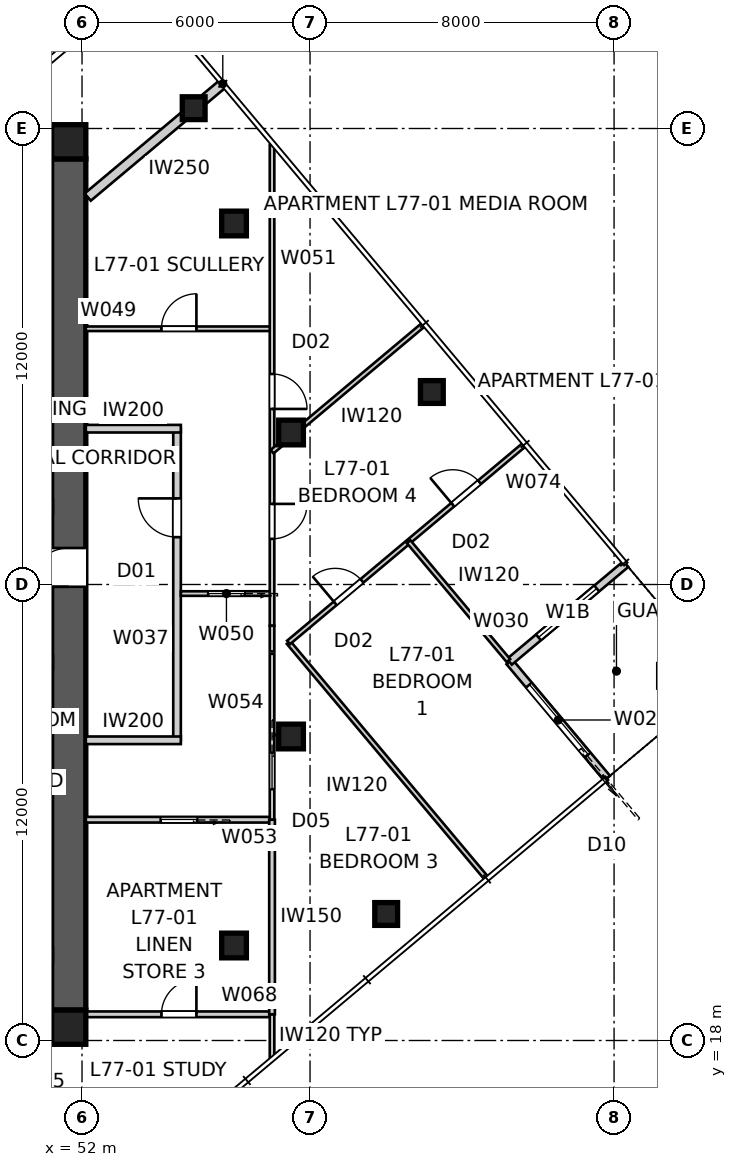
"""IFC4 building model, lengths in metres.
Left out: names, types, materials, properties, quantities, classifications, styles, units other than length and angle.
Written with IfcOpenShell. Run it as: python <this file> out.ifc"""

import sys

from ifc_helpers import new_model, si_unit, direction, frame, frame_2d, origin, origin_2d, place, context, subcontext, project, spatial, polyline, rectangle, outline, extrude, element, fill, save


model = new_model("IFC4")
c1 = context("Model", 3, precision=1e-05, world=origin(), true_north=direction((0.0, 1.0)))
c2 = subcontext(c1, "Body", "Model", "MODEL_VIEW")
j1 = project(units=[si_unit("LENGTHUNIT", "METRE"), si_unit("PLANEANGLEUNIT", "RADIAN")], contexts=[c1])
p1 = place(None, origin())
s1 = spatial("IfcSite", under=j1, at=p1, CompositionType="ELEMENT")
p2 = place(p1, origin())
s2 = spatial("IfcBuilding", under=s1, at=p2, CompositionType="ELEMENT")
p3 = place(p2, frame((0.0, 0.0, 279.4)))
s3 = spatial("IfcBuildingStorey", under=s2, at=p3, CompositionType="ELEMENT", Elevation=279.4)
for number, where, z_axis, x_axis in (
    (1, (28.8, 41.65, 0.0), (0.0, 0.0, 1.0), (1.0, 0.0, 0.0)),
    (2, (51.2, 18.35, 0.0), (0.0, 0.0, 1.0), (-1.0, 0.0, 0.0)),
):
    element("IfcWall", number, at=place(p3, frame(where, z_axis=z_axis, x_axis=x_axis)), inside=s3, PredefinedType="SHEAR", context=c2, shape_type="SweptSolid", body=[
        extrude(outline(polyline([(0.0, -0.45), (22.4, -0.45), (22.4, -0.025), (22.85, -0.025), (22.85, 0.025), (22.4, 0.025), (22.4, 0.45), (0.0, 0.45), (0.0, 0.025), (-0.45, 0.025), (-0.45, -0.025), (0.0, -0.025), (0.0, -0.45)])), origin(), (0.0, 0.0, 1.0), 3.4),
    ])
p4 = place(p3, frame((51.65, 18.8, 0.0), z_axis=(0.0, 0.0, 1.0), x_axis=(0.0, 1.0, 0.0)))
e3 = element("IfcWall", 3, at=p4, inside=s3, PredefinedType="SHEAR", context=c2, shape_type="SweptSolid", body=[
    extrude(outline(polyline([(0.0, -0.45), (22.4, -0.45), (22.4, -0.025), (22.85, -0.025), (22.85, 0.025), (22.4, 0.025), (22.4, 0.45), (0.0, 0.45), (0.0, 0.025), (-0.45, 0.025), (-0.45, -0.025), (0.0, -0.025), (0.0, -0.45)])), origin(), (0.0, 0.0, 1.0), 3.4),
])
p5 = place(p4, frame((11.14, 0.0, 0.0)))
e4 = element("IfcOpeningElement", 4, at=p5, cuts=e3, PredefinedType="OPENING", context=c2, shape_type="SweptSolid", body=[
    extrude(rectangle(XDim=1.02, YDim=2.4, at=frame_2d((0.51, 1.2))), frame((0.0, 0.46, 0.0), z_axis=(0.0, -1.0, 0.0), x_axis=(1.0, 0.0, 0.0)), (0.0, 0.0, 1.0), 0.92),
])
for number, where, z_axis, x_axis in (
    (5, (51.65, 18.35, 0.0), (0.0, 0.0, 1.0), (1.0, 0.0, 0.0)),
    (6, (51.65, 41.65, 0.0), (0.0, 0.0, 1.0), (1.0, 0.0, 0.0)),
):
    element("IfcColumn", number, at=place(p3, frame(where, z_axis=z_axis, x_axis=x_axis)), inside=s3, PredefinedType="COLUMN", context=c2, shape_type="SweptSolid", body=[
        extrude(rectangle(XDim=0.9, YDim=0.9, at=origin_2d()), origin(), (0.0, 0.0, 1.0), 3.4),
    ])
for number, where, z_axis, x_axis in (
    (7, (60.003, 21.329, 0.0), (0.0, 0.0, 1.0), (1.0, 0.0, 0.0)),
    (8, (61.205, 35.065, 0.0), (0.0, 0.0, 1.0), (1.0, 0.0, 0.0)),
    (9, (54.938, 42.534, 0.0), (0.0, 0.0, 1.0), (1.0, 0.0, 0.0)),
):
    element("IfcColumn", number, at=place(p3, frame(where, z_axis=z_axis, x_axis=x_axis)), inside=s3, PredefinedType="COLUMN", context=c2, shape_type="SweptSolid", body=[
        extrude(rectangle(XDim=0.6, YDim=0.6, at=origin_2d()), origin(), (0.0, 0.0, 1.0), 3.4),
    ])
for number, where, z_axis, x_axis in (
    (10, (57.5, 26.0, 0.0), (0.0, 0.0, 1.0), (1.0, 0.0, 0.0)),
    (11, (57.5, 34.0, 0.0), (0.0, 0.0, 1.0), (1.0, 0.0, 0.0)),
    (12, (56.0, 39.5, 0.0), (0.0, 0.0, 1.0), (1.0, 0.0, 0.0)),
    (13, (56.0, 20.5, 0.0), (0.0, 0.0, 1.0), (1.0, 0.0, 0.0)),
):
    element("IfcColumn", number, at=place(p3, frame(where, z_axis=z_axis, x_axis=x_axis)), inside=s3, PredefinedType="COLUMN", context=c2, shape_type="SweptSolid", body=[
        extrude(rectangle(XDim=0.65, YDim=0.65, at=origin_2d()), origin(), (0.0, 0.0, 1.0), 3.4),
    ])
p6 = place(p3, frame((65.817, 24.902, 0.0), z_axis=(0.0, 0.0, 1.0), x_axis=(-0.642768287094, 0.766060656284, 0.0)))
e14 = element("IfcWall", 14, at=p6, inside=s3, PredefinedType="SOLIDWALL", context=c2, shape_type="SweptSolid", body=[
    extrude(rectangle(XDim=4.0, YDim=0.2, at=frame_2d((2.0, 0.0))), origin(), (0.0, 0.0, 1.0), 3.25),
])
p7 = place(p6, frame((0.8, 0.0, 0.0)))
e15 = element("IfcOpeningElement", 15, at=p7, cuts=e14, PredefinedType="OPENING", context=c2, shape_type="SweptSolid", body=[
    extrude(rectangle(XDim=2.4, YDim=2.4, at=frame_2d((1.2, 1.2))), frame((0.0, 0.11, 0.0), z_axis=(0.0, -1.0, 0.0), x_axis=(1.0, 0.0, 0.0)), (0.0, 0.0, 1.0), 0.22),
])
p8 = place(p3, frame((63.246, 27.966, 0.0), z_axis=(0.0, 0.0, 1.0), x_axis=(0.766035437498, 0.642798342015, 0.0)))
e16 = element("IfcWall", 16, at=p8, inside=s3, PredefinedType="SOLIDWALL", context=c2, shape_type="SweptSolid", body=[
    extrude(rectangle(XDim=4.0, YDim=0.2, at=frame_2d((2.0, 0.0))), origin(), (0.0, 0.0, 1.0), 3.25),
])
p9 = place(p8, frame((1.0, 0.0, 0.45)))
e17 = element("IfcOpeningElement", 17, at=p9, cuts=e16, PredefinedType="OPENING", context=c2, shape_type="SweptSolid", body=[
    extrude(rectangle(XDim=2.0, YDim=1.8, at=frame_2d((1.0, 0.9))), frame((0.0, 0.11, 0.0), z_axis=(0.0, -1.0, 0.0), x_axis=(1.0, 0.0, 0.0)), (0.0, 0.0, 1.0), 0.22),
])
p10 = place(p3, frame((54.5, 25.9, 0.0), z_axis=(0.0, 0.0, 1.0), x_axis=(0.0, 1.0, 0.0)))
e18 = element("IfcWall", 18, at=p10, inside=s3, PredefinedType="PARTITIONING", context=c2, shape_type="SweptSolid", body=[
    extrude(rectangle(XDim=8.2, YDim=0.2, at=frame_2d((4.1, 0.0))), origin(), (0.0, 0.0, 1.0), 3.25),
])
p11 = place(p10, frame((5.346, 0.0, 0.0)))
e19 = element("IfcOpeningElement", 19, at=p11, cuts=e18, PredefinedType="OPENING", context=c2, shape_type="SweptSolid", body=[
    extrude(rectangle(XDim=1.02, YDim=2.34, at=frame_2d((0.51, 1.17))), frame((0.0, 0.11, 0.0), z_axis=(0.0, -1.0, 0.0), x_axis=(1.0, 0.0, 0.0)), (0.0, 0.0, 1.0), 0.22),
])
for number, where, z_axis, x_axis in (
    (20, (52.1, 34.1, 0.0), (0.0, 0.0, 1.0), (1.0, 0.0, 0.0)),
    (21, (52.1, 25.9, 0.0), (0.0, 0.0, 1.0), (1.0, 0.0, 0.0)),
):
    element("IfcWall", number, at=place(p3, frame(where, z_axis=z_axis, x_axis=x_axis)), inside=s3, PredefinedType="PARTITIONING", context=c2, shape_type="SweptSolid", body=[
        extrude(rectangle(XDim=2.5, YDim=0.2, at=frame_2d((1.25, 0.0))), origin(), (0.0, 0.0, 1.0), 3.25),
    ])
p12 = place(p3, frame((55.704, 43.177, 0.0), z_axis=(0.0, 0.0, 1.0), x_axis=(-0.76603440109, -0.64279957712, 0.0)))
e22 = element("IfcWall", 22, at=p12, inside=s3, PredefinedType="PARTITIONING", context=c2, shape_type="SweptSolid", body=[
    extrude(rectangle(XDim=4.64, YDim=0.25, at=frame_2d((2.32, 0.0))), origin(), (0.0, 0.0, 1.0), 3.25),
])
p13 = place(p3, frame((52.1, 36.73, 0.0), z_axis=(0.0, 0.0, 1.0), x_axis=(1.0, 0.0, 0.0)))
e23 = element("IfcWall", 23, at=p13, inside=s3, PredefinedType="PARTITIONING", context=c2, shape_type="SweptSolid", body=[
    extrude(rectangle(XDim=4.9, YDim=0.12, at=frame_2d((2.45, 0.0))), origin(), (0.0, 0.0, 1.0), 3.25),
])
p14 = place(p13, frame((1.99, 0.0, 0.0)))
e24 = element("IfcOpeningElement", 24, at=p14, cuts=e23, PredefinedType="OPENING", context=c2, shape_type="SweptSolid", body=[
    extrude(rectangle(XDim=0.92, YDim=2.34, at=frame_2d((0.46, 1.17))), frame((0.0, 0.07, 0.0), z_axis=(0.0, -1.0, 0.0), x_axis=(1.0, 0.0, 0.0)), (0.0, 0.0, 1.0), 0.14),
])
p15 = place(p3, frame((57.0, 29.761, 0.0), z_axis=(0.0, 0.0, 1.0), x_axis=(-1.0, 0.0, 0.0)))
e25 = element("IfcWall", 25, at=p15, inside=s3, PredefinedType="PARTITIONING", context=c2, shape_type="SweptSolid", body=[
    extrude(rectangle(XDim=2.4, YDim=0.12, at=frame_2d((1.2, 0.0))), origin(), (0.0, 0.0, 1.0), 3.25),
])
p16 = place(p15, frame((0.72, 0.0, 0.0)))
e26 = element("IfcOpeningElement", 26, at=p16, cuts=e25, PredefinedType="OPENING", context=c2, shape_type="SweptSolid", body=[
    extrude(rectangle(XDim=0.96, YDim=2.1, at=frame_2d((0.48, 1.05))), frame((0.0, 0.07, 0.0), z_axis=(0.0, -1.0, 0.0), x_axis=(1.0, 0.0, 0.0)), (0.0, 0.0, 1.0), 0.14),
])
p17 = place(p3, frame((57.0, 41.57, 0.0), z_axis=(0.0, 0.0, 1.0), x_axis=(0.0, -1.0, 0.0)))
e27 = element("IfcWall", 27, at=p17, inside=s3, PredefinedType="PARTITIONING", context=c2, shape_type="SweptSolid", body=[
    extrude(rectangle(XDim=12.656, YDim=0.12, at=frame_2d((6.328, 0.0))), origin(), (0.0, 0.0, 1.0), 2.55),
])
p18 = place(p17, frame((9.449, 0.0, 0.0)))
e28 = element("IfcOpeningElement", 28, at=p18, cuts=e27, PredefinedType="OPENING", context=c2, shape_type="SweptSolid", body=[
    extrude(rectangle(XDim=0.92, YDim=2.34, at=frame_2d((0.46, 1.17))), frame((0.0, 0.07, 0.0), z_axis=(0.0, -1.0, 0.0), x_axis=(1.0, 0.0, 0.0)), (0.0, 0.0, 1.0), 0.14),
])
p19 = place(p17, frame((6.031, 0.0, 0.0)))
e29 = element("IfcOpeningElement", 29, at=p19, cuts=e27, PredefinedType="OPENING", context=c2, shape_type="SweptSolid", body=[
    extrude(rectangle(XDim=0.92, YDim=2.34, at=frame_2d((0.46, 1.17))), frame((0.0, 0.07, 0.0), z_axis=(0.0, -1.0, 0.0), x_axis=(1.0, 0.0, 0.0)), (0.0, 0.0, 1.0), 0.14),
])
p20 = place(p3, frame((57.0, 23.81, 0.0), z_axis=(0.0, 0.0, 1.0), x_axis=(-1.0, 0.0, 0.0)))
e30 = element("IfcWall", 30, at=p20, inside=s3, PredefinedType="SOLIDWALL", context=c2, shape_type="SweptSolid", body=[
    extrude(rectangle(XDim=4.9, YDim=0.15, at=frame_2d((2.45, 0.0))), origin(), (0.0, 0.0, 1.0), 3.25),
])
p21 = place(p20, frame((1.97, 0.0, 0.0)))
e31 = element("IfcOpeningElement", 31, at=p21, cuts=e30, PredefinedType="OPENING", context=c2, shape_type="SweptSolid", body=[
    extrude(rectangle(XDim=0.96, YDim=2.1, at=frame_2d((0.48, 1.05))), frame((0.0, 0.085, 0.0), z_axis=(0.0, -1.0, 0.0), x_axis=(1.0, 0.0, 0.0)), (0.0, 0.0, 1.0), 0.17),
])
p22 = place(p3, frame((57.0, 28.176, 0.0), z_axis=(0.0, 0.0, 1.0), x_axis=(0.0, -1.0, 0.0)))
e32 = element("IfcWall", 32, at=p22, inside=s3, PredefinedType="PARTITIONING", context=c2, shape_type="SweptSolid", body=[
    extrude(rectangle(XDim=4.365, YDim=0.12, at=frame_2d((2.183, 0.0))), origin(), (0.0, 0.0, 1.0), 2.55),
])
p23 = place(p22, frame((2.603, 0.0, 0.0)))
e33 = element("IfcOpeningElement", 33, at=p23, cuts=e32, PredefinedType="OPENING", context=c2, shape_type="SweptSolid", body=[
    extrude(rectangle(XDim=0.96, YDim=2.1, at=frame_2d((0.48, 1.05))), frame((0.0, 0.07, 0.0), z_axis=(0.0, -1.0, 0.0), x_axis=(1.0, 0.0, 0.0)), (0.0, 0.0, 1.0), 0.14),
])
p24 = place(p3, frame((51.18, 18.689, 0.0), z_axis=(0.0, 0.0, 1.0), x_axis=(1.0, 0.0, 0.0)))
e34 = element("IfcWall", 34, at=p24, inside=s3, PredefinedType="SOLIDWALL", context=c2, shape_type="SweptSolid", body=[
    extrude(rectangle(XDim=5.82, YDim=0.15, at=frame_2d((2.91, 0.0))), origin(), (0.0, 0.0, 1.0), 3.25),
])
p25 = place(p24, frame((2.91, 0.0, 0.0)))
e35 = element("IfcOpeningElement", 35, at=p25, cuts=e34, PredefinedType="OPENING", context=c2, shape_type="SweptSolid", body=[
    extrude(rectangle(XDim=0.92, YDim=2.1, at=frame_2d((0.46, 1.05))), frame((0.0, 0.085, 0.0), z_axis=(0.0, -1.0, 0.0), x_axis=(1.0, 0.0, 0.0)), (0.0, 0.0, 1.0), 0.17),
])
p26 = place(p3, frame((57.0, 18.689, 0.0), z_axis=(0.0, 0.0, 1.0), x_axis=(0.0, -1.0, 0.0)))
e36 = element("IfcWall", 36, at=p26, inside=s3, PredefinedType="PARTITIONING", context=c2, shape_type="SweptSolid", body=[
    extrude(rectangle(XDim=1.133, YDim=0.12, at=frame_2d((0.567, 0.0))), origin(), (0.0, 0.0, 1.0), 3.25),
])
p27 = place(p3, frame((57.0, 23.81, 0.0), z_axis=(0.0, 0.0, 1.0), x_axis=(0.0, -1.0, 0.0)))
e37 = element("IfcWall", 37, at=p27, inside=s3, PredefinedType="SOLIDWALL", context=c2, shape_type="SweptSolid", body=[
    extrude(rectangle(XDim=5.121, YDim=0.15, at=frame_2d((2.56, 0.0))), origin(), (0.0, 0.0, 1.0), 3.25),
])
p28 = place(p3, frame((62.631, 22.281, 0.0), z_axis=(0.0, 0.0, 1.0), x_axis=(-0.642800378028, 0.766033729027, 0.0)))
e38 = element("IfcWall", 38, at=p28, inside=s3, PredefinedType="PARTITIONING", context=c2, shape_type="SweptSolid", body=[
    extrude(rectangle(XDim=8.085, YDim=0.12, at=frame_2d((4.042, 0.0))), origin(), (0.0, 0.0, 1.0), 3.25),
])
p29 = place(p3, frame((57.434, 28.475, 0.0), z_axis=(0.0, 0.0, 1.0), x_axis=(0.766033729027, 0.642800378028, 0.0)))
e39 = element("IfcWall", 39, at=p29, inside=s3, PredefinedType="PARTITIONING", context=c2, shape_type="SweptSolid", body=[
    extrude(rectangle(XDim=8.085, YDim=0.12, at=frame_2d((4.042, 0.0))), origin(), (0.0, 0.0, 1.0), 3.25),
])
p30 = place(p29, frame((1.603, 0.0, 0.0)))
e40 = element("IfcOpeningElement", 40, at=p30, cuts=e39, PredefinedType="OPENING", context=c2, shape_type="SweptSolid", body=[
    extrude(rectangle(XDim=0.92, YDim=2.34, at=frame_2d((0.46, 1.17))), frame((0.0, 0.07, 0.0), z_axis=(0.0, -1.0, 0.0), x_axis=(1.0, 0.0, 0.0)), (0.0, 0.0, 1.0), 0.14),
])
p31 = place(p29, frame((5.64, 0.0, 0.0)))
e41 = element("IfcOpeningElement", 41, at=p31, cuts=e39, PredefinedType="OPENING", context=c2, shape_type="SweptSolid", body=[
    extrude(rectangle(XDim=0.92, YDim=2.34, at=frame_2d((0.46, 1.17))), frame((0.0, 0.07, 0.0), z_axis=(0.0, -1.0, 0.0), x_axis=(1.0, 0.0, 0.0)), (0.0, 0.0, 1.0), 0.14),
])
p32 = place(p3, frame((60.594, 31.126, 0.0), z_axis=(0.0, 0.0, 1.0), x_axis=(0.642767300664, -0.766061483953, 0.0)))
e42 = element("IfcWall", 42, at=p32, inside=s3, PredefinedType="PARTITIONING", context=c2, shape_type="SweptSolid", body=[
    extrude(rectangle(XDim=4.085, YDim=0.12, at=frame_2d((2.042, 0.0))), origin(), (0.0, 0.0, 1.0), 3.25),
])
p33 = place(p3, frame((57.0, 33.495, 0.0), z_axis=(0.0, 0.0, 1.0), x_axis=(0.76605407051, 0.642776136034, 0.0)))
e43 = element("IfcWall", 43, at=p33, inside=s3, PredefinedType="PARTITIONING", context=c2, shape_type="SweptSolid", body=[
    extrude(rectangle(XDim=5.191, YDim=0.12, at=frame_2d((2.595, 0.0))), origin(), (0.0, 0.0, 1.0), 3.25),
])
p34 = place(p3, frame((49.136, 42.1, 0.0), z_axis=(0.0, 0.0, 1.0), x_axis=(0.766055078255, 0.642774935012, 0.0)))
e44 = element("IfcWall", 44, at=p34, inside=s3, PredefinedType="SOLIDWALL", context=c2, shape_type="SweptSolid", body=[
    extrude(rectangle(XDim=5.684, YDim=0.15, at=frame_2d((2.842, 0.0))), origin(), (0.0, 0.0, 1.0), 3.25),
])
p35 = place(p34, frame((2.402, 0.0, 0.0)))
e45 = element("IfcOpeningElement", 45, at=p35, cuts=e44, PredefinedType="OPENING", context=c2, shape_type="SweptSolid", body=[
    extrude(rectangle(XDim=0.92, YDim=2.1, at=frame_2d((0.46, 1.05))), frame((0.0, 0.085, 0.0), z_axis=(0.0, -1.0, 0.0), x_axis=(1.0, 0.0, 0.0)), (0.0, 0.0, 1.0), 0.17),
])
p36 = place(p3, frame((57.0, 28.915, 0.0), z_axis=(0.0, 0.0, 1.0), x_axis=(0.0, -1.0, 0.0)))
e46 = element("IfcWall", 46, at=p36, inside=s3, PredefinedType="PARTITIONING", context=c2, shape_type="SweptSolid", body=[
    extrude(rectangle(XDim=0.676, YDim=0.12, at=frame_2d((0.338, 0.0))), origin(), (0.0, 0.0, 1.0), 3.25),
])
p37 = place(p7, origin())
e47 = element("IfcDoor", 47, at=p37, inside=s3, OperationType="SLIDING_TO_LEFT", PredefinedType="DOOR", context=c2, shape_type="SweptSolid", body=[
    extrude(rectangle(XDim=2.4, YDim=2.4, at=frame_2d((1.2, 1.2))), frame((0.0, 0.025, 0.0), z_axis=(0.0, -1.0, 0.0), x_axis=(1.0, 0.0, 0.0)), (0.0, 0.0, 1.0), 0.05),
])
fill(e15, e47)
p38 = place(p9, origin())
e48 = element("IfcWindow", 48, at=p38, inside=s3, PartitioningType="SINGLE_PANEL", PredefinedType="WINDOW", context=c2, shape_type="SweptSolid", body=[
    extrude(rectangle(XDim=2.0, YDim=1.8, at=frame_2d((1.0, 0.9))), frame((0.0, 0.03, 0.0), z_axis=(0.0, -1.0, 0.0), x_axis=(1.0, 0.0, 0.0)), (0.0, 0.0, 1.0), 0.06),
])
fill(e17, e48)
p39 = place(p11, origin())
e49 = element("IfcDoor", 49, at=p39, inside=s3, OperationType="SINGLE_SWING_RIGHT", PredefinedType="DOOR", context=c2, shape_type="SweptSolid", body=[
    extrude(rectangle(XDim=1.02, YDim=2.34, at=frame_2d((0.51, 1.17))), frame((0.0, 0.025, 0.0), z_axis=(0.0, -1.0, 0.0), x_axis=(1.0, 0.0, 0.0)), (0.0, 0.0, 1.0), 0.05),
])
fill(e19, e49)
p40 = place(p14, origin())
e50 = element("IfcDoor", 50, at=p40, inside=s3, OperationType="SINGLE_SWING_RIGHT", PredefinedType="DOOR", context=c2, shape_type="SweptSolid", body=[
    extrude(rectangle(XDim=0.92, YDim=2.34, at=frame_2d((0.46, 1.17))), frame((0.0, 0.025, 0.0), z_axis=(0.0, -1.0, 0.0), x_axis=(1.0, 0.0, 0.0)), (0.0, 0.0, 1.0), 0.05),
])
fill(e24, e50)
p41 = place(p18, origin())
e51 = element("IfcDoor", 51, at=p41, inside=s3, OperationType="SINGLE_SWING_LEFT", PredefinedType="DOOR", context=c2, shape_type="SweptSolid", body=[
    extrude(rectangle(XDim=0.92, YDim=2.34, at=frame_2d((0.46, 1.17))), frame((0.0, 0.025, 0.0), z_axis=(0.0, -1.0, 0.0), x_axis=(1.0, 0.0, 0.0)), (0.0, 0.0, 1.0), 0.05),
])
fill(e28, e51)
p42 = place(p19, origin())
e52 = element("IfcDoor", 52, at=p42, inside=s3, OperationType="SINGLE_SWING_RIGHT", PredefinedType="DOOR", context=c2, shape_type="SweptSolid", body=[
    extrude(rectangle(XDim=0.92, YDim=2.34, at=frame_2d((0.46, 1.17))), frame((0.0, 0.025, 0.0), z_axis=(0.0, -1.0, 0.0), x_axis=(1.0, 0.0, 0.0)), (0.0, 0.0, 1.0), 0.05),
])
fill(e29, e52)
p43 = place(p16, origin())
e53 = element("IfcDoor", 53, at=p43, inside=s3, OperationType="SLIDING_TO_LEFT", PredefinedType="DOOR", context=c2, shape_type="SweptSolid", body=[
    extrude(rectangle(XDim=0.96, YDim=2.1, at=frame_2d((0.48, 1.05))), frame((0.0, 0.025, 0.0), z_axis=(0.0, -1.0, 0.0), x_axis=(1.0, 0.0, 0.0)), (0.0, 0.0, 1.0), 0.05),
])
fill(e26, e53)
p44 = place(p21, origin())
e54 = element("IfcDoor", 54, at=p44, inside=s3, OperationType="SLIDING_TO_LEFT", PredefinedType="DOOR", context=c2, shape_type="SweptSolid", body=[
    extrude(rectangle(XDim=0.96, YDim=2.1, at=frame_2d((0.48, 1.05))), frame((0.0, 0.025, 0.0), z_axis=(0.0, -1.0, 0.0), x_axis=(1.0, 0.0, 0.0)), (0.0, 0.0, 1.0), 0.05),
])
fill(e31, e54)
p45 = place(p23, origin())
e55 = element("IfcDoor", 55, at=p45, inside=s3, OperationType="SLIDING_TO_LEFT", PredefinedType="DOOR", context=c2, shape_type="SweptSolid", body=[
    extrude(rectangle(XDim=0.96, YDim=2.1, at=frame_2d((0.48, 1.05))), frame((0.0, 0.025, 0.0), z_axis=(0.0, -1.0, 0.0), x_axis=(1.0, 0.0, 0.0)), (0.0, 0.0, 1.0), 0.05),
])
fill(e33, e55)
p46 = place(p25, origin())
e56 = element("IfcDoor", 56, at=p46, inside=s3, OperationType="SINGLE_SWING_RIGHT", PredefinedType="DOOR", context=c2, shape_type="SweptSolid", body=[
    extrude(rectangle(XDim=0.92, YDim=2.1, at=frame_2d((0.46, 1.05))), frame((0.0, 0.025, 0.0), z_axis=(0.0, -1.0, 0.0), x_axis=(1.0, 0.0, 0.0)), (0.0, 0.0, 1.0), 0.05),
])
fill(e35, e56)
p47 = place(p35, origin())
e57 = element("IfcDoor", 57, at=p47, inside=s3, OperationType="SINGLE_SWING_LEFT", PredefinedType="DOOR", context=c2, shape_type="SweptSolid", body=[
    extrude(rectangle(XDim=0.92, YDim=2.1, at=frame_2d((0.46, 1.05))), frame((0.0, 0.025, 0.0), z_axis=(0.0, -1.0, 0.0), x_axis=(1.0, 0.0, 0.0)), (0.0, 0.0, 1.0), 0.05),
])
fill(e45, e57)
p48 = place(p30, origin())
e58 = element("IfcDoor", 58, at=p48, inside=s3, OperationType="SINGLE_SWING_LEFT", PredefinedType="DOOR", context=c2, shape_type="SweptSolid", body=[
    extrude(rectangle(XDim=0.92, YDim=2.34, at=frame_2d((0.46, 1.17))), frame((0.0, 0.025, 0.0), z_axis=(0.0, -1.0, 0.0), x_axis=(1.0, 0.0, 0.0)), (0.0, 0.0, 1.0), 0.05),
])
fill(e40, e58)
p49 = place(p31, origin())
e59 = element("IfcDoor", 59, at=p49, inside=s3, OperationType="SINGLE_SWING_LEFT", PredefinedType="DOOR", context=c2, shape_type="SweptSolid", body=[
    extrude(rectangle(XDim=0.92, YDim=2.34, at=frame_2d((0.46, 1.17))), frame((0.0, 0.025, 0.0), z_axis=(0.0, -1.0, 0.0), x_axis=(1.0, 0.0, 0.0)), (0.0, 0.0, 1.0), 0.05),
])
fill(e41, e59)
p50 = place(p5, origin())
e60 = element("IfcDoor", 60, at=p50, inside=s3, OperationType="SINGLE_SWING_LEFT", PredefinedType="DOOR", context=c2, shape_type="SweptSolid", body=[
    extrude(rectangle(XDim=1.02, YDim=2.4, at=frame_2d((0.51, 1.2))), frame((0.0, 0.025, 0.0), z_axis=(0.0, -1.0, 0.0), x_axis=(1.0, 0.0, 0.0)), (0.0, 0.0, 1.0), 0.05),
])
fill(e4, e60)
save(model, sys.argv[1])
